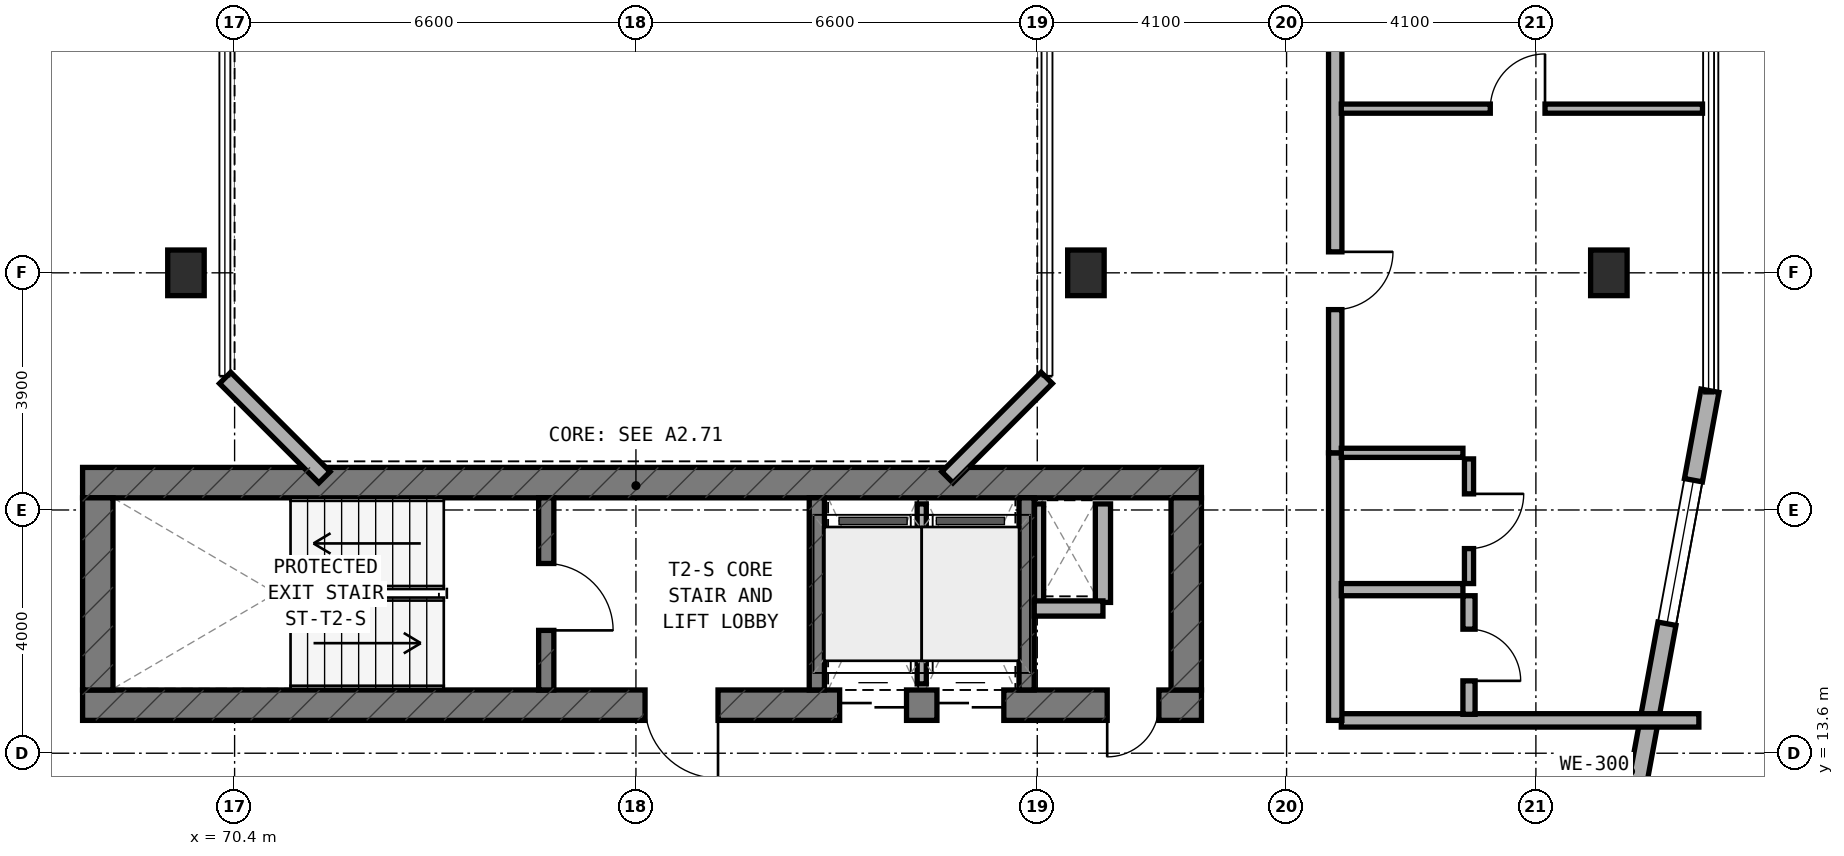
"""IFC4 building model, lengths in metres.
Left out: names, types, materials, properties, quantities, classifications, styles, units other than length and angle.
Written with IfcOpenShell. Run it as: python <this file> out.ifc"""

import sys

from ifc_helpers import new_model, si_unit, direction, frame, frame_2d, origin, origin_2d, place, context, subcontext, project, spatial, rectangle, extrude, element, fill, save


model = new_model("IFC4")
c1 = context("Model", 3, precision=1e-05, world=origin(), true_north=direction((0.0, 1.0)))
c2 = subcontext(c1, "Body", "Model", "MODEL_VIEW")
j1 = project(units=[si_unit("LENGTHUNIT", "METRE"), si_unit("PLANEANGLEUNIT", "RADIAN")], contexts=[c1])
p1 = place(None, origin())
s1 = spatial("IfcSite", under=j1, at=p1, CompositionType="ELEMENT")
p2 = place(p1, origin())
s2 = spatial("IfcBuilding", under=s1, at=p2, CompositionType="ELEMENT")
p3 = place(p2, frame((0.0, 0.0, 83.5)))
s3 = spatial("IfcBuildingStorey", under=s2, at=p3, CompositionType="ELEMENT", Elevation=83.5)
p4 = place(p3, frame((67.9, 14.39, 0.0), z_axis=(0.0, 0.0, 1.0), x_axis=(1.0, 0.0, 0.0)))
e1 = element("IfcWall", 1, at=p4, inside=s3, PredefinedType="SHEAR", context=c2, shape_type="SweptSolid", body=[
    extrude(rectangle(XDim=18.4, YDim=0.5, at=frame_2d((9.2, 0.0))), origin(), (0.0, 0.0, 1.0), 3.5),
])
p5 = place(p4, frame((9.25, 0.0, 0.0)))
e2 = element("IfcOpeningElement", 2, at=p5, cuts=e1, PredefinedType="OPENING", context=c2, shape_type="SweptSolid", body=[
    extrude(rectangle(XDim=1.2, YDim=2.15, at=frame_2d((0.6, 1.075))), frame((0.0, 0.26, 0.0), z_axis=(0.0, -1.0, 0.0), x_axis=(1.0, 0.0, 0.0)), (0.0, 0.0, 1.0), 0.52),
])
p6 = place(p4, frame((16.85, 0.0, 0.0)))
e3 = element("IfcOpeningElement", 3, at=p6, cuts=e1, PredefinedType="OPENING", context=c2, shape_type="SweptSolid", body=[
    extrude(rectangle(XDim=0.85, YDim=2.1, at=frame_2d((0.425, 1.05))), frame((0.0, 0.26, 0.0), z_axis=(0.0, -1.0, 0.0), x_axis=(1.0, 0.0, 0.0)), (0.0, 0.0, 1.0), 0.52),
])
p7 = place(p4, frame((12.45, 0.0, 0.0)))
e4 = element("IfcOpeningElement", 4, at=p7, cuts=e1, PredefinedType="OPENING", context=c2, shape_type="SweptSolid", body=[
    extrude(rectangle(XDim=1.1, YDim=2.15, at=frame_2d((0.55, 1.075))), frame((0.0, 0.26, 0.0), z_axis=(0.0, -1.0, 0.0), x_axis=(1.0, 0.0, 0.0)), (0.0, 0.0, 1.0), 0.52),
])
p8 = place(p4, frame((14.05, 0.0, 0.0)))
e5 = element("IfcOpeningElement", 5, at=p8, cuts=e1, PredefinedType="OPENING", context=c2, shape_type="SweptSolid", body=[
    extrude(rectangle(XDim=1.1, YDim=2.15, at=frame_2d((0.55, 1.075))), frame((0.0, 0.26, 0.0), z_axis=(0.0, -1.0, 0.0), x_axis=(1.0, 0.0, 0.0)), (0.0, 0.0, 1.0), 0.52),
])
p9 = place(p3, frame((67.9, 18.05, 0.0), z_axis=(0.0, 0.0, 1.0), x_axis=(1.0, 0.0, 0.0)))
e6 = element("IfcWall", 6, at=p9, inside=s3, PredefinedType="SHEAR", context=c2, shape_type="SweptSolid", body=[
    extrude(rectangle(XDim=18.4, YDim=0.5, at=frame_2d((9.2, 0.0))), origin(), (0.0, 0.0, 1.0), 3.5),
])
for number, where, z_axis, x_axis in (
    (7, (68.15, 14.64, 0.0), (0.0, 0.0, 1.0), (0.0, 1.0, 0.0)),
    (8, (86.05, 14.64, 0.0), (0.0, 0.0, 1.0), (0.0, 1.0, 0.0)),
):
    element("IfcWall", number, at=place(p3, frame(where, z_axis=z_axis, x_axis=x_axis)), inside=s3, PredefinedType="SHEAR", context=c2, shape_type="SweptSolid", body=[
        extrude(rectangle(XDim=3.16, YDim=0.5, at=frame_2d((1.58, 0.0))), origin(), (0.0, 0.0, 1.0), 3.5),
    ])
p10 = place(p3, frame((75.525, 14.64, 0.0), z_axis=(0.0, 0.0, 1.0), x_axis=(0.0, 1.0, 0.0)))
e9 = element("IfcWall", 9, at=p10, inside=s3, PredefinedType="STANDARD", context=c2, shape_type="SweptSolid", body=[
    extrude(rectangle(XDim=3.16, YDim=0.25, at=frame_2d((1.58, 0.0))), origin(), (0.0, 0.0, 1.0), 3.25),
])
p11 = place(p10, frame((0.98, 0.0, 0.0)))
e10 = element("IfcOpeningElement", 10, at=p11, cuts=e9, PredefinedType="OPENING", context=c2, shape_type="SweptSolid", body=[
    extrude(rectangle(XDim=1.1, YDim=2.15, at=frame_2d((0.55, 1.075))), frame((0.0, 0.135, 0.0), z_axis=(0.0, -1.0, 0.0), x_axis=(1.0, 0.0, 0.0)), (0.0, 0.0, 1.0), 0.27),
])
for number, where, z_axis, x_axis in (
    (11, (79.975, 14.64, 0.0), (0.0, 0.0, 1.0), (0.0, 1.0, 0.0)),
    (12, (83.425, 14.64, 0.0), (0.0, 0.0, 1.0), (0.0, 1.0, 0.0)),
):
    element("IfcWall", number, at=place(p3, frame(where, z_axis=z_axis, x_axis=x_axis)), inside=s3, PredefinedType="STANDARD", context=c2, shape_type="SweptSolid", body=[
        extrude(rectangle(XDim=3.16, YDim=0.25, at=frame_2d((1.58, 0.0))), origin(), (0.0, 0.0, 1.0), 3.25),
    ])
for number, where, z_axis, x_axis in (
    (13, (93.0, 21.5, 0.0), (0.0, 0.0, 1.0), (1.0, 0.0, 0.0)),
    (14, (69.6, 21.5, 0.0), (0.0, 0.0, 1.0), (1.0, 0.0, 0.0)),
    (15, (84.4, 21.5, 0.0), (0.0, 0.0, 1.0), (1.0, 0.0, 0.0)),
):
    element("IfcColumn", number, at=place(p3, frame(where, z_axis=z_axis, x_axis=x_axis)), inside=s3, PredefinedType="COLUMN", context=c2, shape_type="SweptSolid", body=[
        extrude(rectangle(XDim=0.6, YDim=0.75, at=origin_2d()), origin(), (0.0, 0.0, 1.0), 3.5),
    ])
p12 = place(p3, frame((93.051, 10.819, 0.0), z_axis=(0.0, 0.0, 1.0), x_axis=(0.181241420611, 0.983438634311, 0.0)))
e16 = element("IfcWall", 16, at=p12, inside=s3, PredefinedType="STANDARD", context=c2, shape_type="SweptSolid", body=[
    extrude(rectangle(XDim=8.889, YDim=0.3, at=frame_2d((4.445, 0.0))), origin(), (0.0, 0.0, 1.0), 3.25),
])
p13 = place(p12, frame((4.993, 0.0, 0.8)))
e17 = element("IfcOpeningElement", 17, at=p13, cuts=e16, PredefinedType="OPENING", context=c2, shape_type="SweptSolid", body=[
    extrude(rectangle(XDim=2.4, YDim=1.6, at=frame_2d((1.2, 0.8))), frame((0.0, 0.16, 0.0), z_axis=(0.0, -1.0, 0.0), x_axis=(1.0, 0.0, 0.0)), (0.0, 0.0, 1.0), 0.32),
])
for number, where, z_axis, x_axis in (
    (18, (82.122, 18.138, 0.0), (0.0, 0.0, 1.0), (0.707, 0.707, 0.0)),
    (19, (70.244, 19.772, 0.0), (0.0, 0.0, 1.0), (0.707, -0.707, 0.0)),
):
    element("IfcWall", number, at=place(p3, frame(where, z_axis=z_axis, x_axis=x_axis)), inside=s3, PredefinedType="STANDARD", context=c2, shape_type="SweptSolid", body=[
        extrude(rectangle(XDim=2.311, YDim=0.26, at=frame_2d((1.155, 0.0))), origin(), (0.0, 0.0, 1.0), 3.25),
    ])
p14 = place(p3, frame((83.63, 16.08, 0.0), z_axis=(0.0, 0.0, 1.0), x_axis=(0.0, 1.0, 0.0)))
e20 = element("IfcWall", 20, at=p14, inside=s3, PredefinedType="PARTITIONING", context=c2, shape_type="SweptSolid", body=[
    extrude(rectangle(XDim=1.62, YDim=0.15, at=frame_2d((0.81, 0.0))), origin(), (0.0, 0.0, 1.0), 2.825),
])
p15 = place(p3, frame((84.68, 16.08, 0.0), z_axis=(0.0, 0.0, 1.0), x_axis=(0.0, 1.0, 0.0)))
e21 = element("IfcWall", 21, at=p15, inside=s3, PredefinedType="SOLIDWALL", context=c2, shape_type="SweptSolid", body=[
    extrude(rectangle(XDim=1.62, YDim=0.25, at=frame_2d((0.81, 0.0))), origin(), (0.0, 0.0, 1.0), 3.22),
])
p16 = place(p3, frame((83.55, 15.98, 0.0), z_axis=(0.0, 0.0, 1.0), x_axis=(1.0, 0.0, 0.0)))
e22 = element("IfcWall", 22, at=p16, inside=s3, PredefinedType="SOLIDWALL", context=c2, shape_type="SweptSolid", body=[
    extrude(rectangle(XDim=1.13, YDim=0.25, at=frame_2d((0.565, 0.0))), origin(), (0.0, 0.0, 1.0), 3.22),
])
p17 = place(p3, frame((81.7, 14.74, 0.0), z_axis=(0.0, 0.0, 1.0), x_axis=(0.0, 1.0, 0.0)))
e23 = element("IfcWall", 23, at=p17, inside=s3, PredefinedType="PARTITIONING", context=c2, shape_type="SweptSolid", body=[
    extrude(rectangle(XDim=2.96, YDim=0.15, at=frame_2d((1.48, 0.0))), origin(), (0.0, 0.0, 1.0), 3.22),
])
p18 = place(p3, frame((88.6, 14.14, 0.0), z_axis=(0.0, 0.0, 1.0), x_axis=(1.0, 0.0, 0.0)))
e24 = element("IfcWall", 24, at=p18, inside=s3, PredefinedType="SOLIDWALL", context=c2, shape_type="SweptSolid", body=[
    extrude(rectangle(XDim=5.88, YDim=0.22, at=frame_2d((2.94, 0.0))), origin(), (0.0, 0.0, 1.0), 2.945),
])
p19 = place(p3, frame((88.5, 14.14, 0.0), z_axis=(0.0, 0.0, 1.0), x_axis=(0.0, 1.0, 0.0)))
e25 = element("IfcWall", 25, at=p19, inside=s3, PredefinedType="SOLIDWALL", context=c2, shape_type="SweptSolid", body=[
    extrude(rectangle(XDim=4.4, YDim=0.22, at=frame_2d((2.2, 0.0))), origin(), (0.0, 0.0, 1.0), 3.22),
])
p20 = place(p3, frame((88.5, 18.54, 0.0), z_axis=(0.0, 0.0, 1.0), x_axis=(0.0, 1.0, 0.0)))
e26 = element("IfcWall", 26, at=p20, inside=s3, PredefinedType="SOLIDWALL", context=c2, shape_type="SweptSolid", body=[
    extrude(rectangle(XDim=9.46, YDim=0.22, at=frame_2d((4.73, 0.0))), origin(), (0.0, 0.0, 1.0), 2.825),
])
p21 = place(p20, frame((2.355, 0.0, 0.0)))
e27 = element("IfcOpeningElement", 27, at=p21, cuts=e26, PredefinedType="OPENING", context=c2, shape_type="SweptSolid", body=[
    extrude(rectangle(XDim=0.95, YDim=2.1, at=frame_2d((0.475, 1.05))), frame((0.0, 0.12, 0.0), z_axis=(0.0, -1.0, 0.0), x_axis=(1.0, 0.0, 0.0)), (0.0, 0.0, 1.0), 0.24),
])
p22 = place(p3, frame((88.6, 24.2, 0.0), z_axis=(0.0, 0.0, 1.0), x_axis=(1.0, 0.0, 0.0)))
e28 = element("IfcWall", 28, at=p22, inside=s3, PredefinedType="PARTITIONING", context=c2, shape_type="SweptSolid", body=[
    extrude(rectangle(XDim=5.94, YDim=0.15, at=frame_2d((2.97, 0.0))), origin(), (0.0, 0.0, 1.0), 2.945),
])
p23 = place(p22, frame((2.45, 0.0, 0.0)))
e29 = element("IfcOpeningElement", 29, at=p23, cuts=e28, PredefinedType="OPENING", context=c2, shape_type="SweptSolid", body=[
    extrude(rectangle(XDim=0.9, YDim=2.1, at=frame_2d((0.45, 1.05))), frame((0.0, 0.085, 0.0), z_axis=(0.0, -1.0, 0.0), x_axis=(1.0, 0.0, 0.0)), (0.0, 0.0, 1.0), 0.17),
])
p24 = place(p3, frame((88.6, 16.29, 0.0), z_axis=(0.0, 0.0, 1.0), x_axis=(1.0, 0.0, 0.0)))
e30 = element("IfcWall", 30, at=p24, inside=s3, PredefinedType="PLUMBINGWALL", context=c2, shape_type="SweptSolid", body=[
    extrude(rectangle(XDim=2.0, YDim=0.2, at=frame_2d((1.0, 0.0))), origin(), (0.0, 0.0, 1.0), 3.22),
])
p25 = place(p3, frame((88.6, 18.54, 0.0), z_axis=(0.0, 0.0, 1.0), x_axis=(1.0, 0.0, 0.0)))
e31 = element("IfcWall", 31, at=p25, inside=s3, PredefinedType="PARTITIONING", context=c2, shape_type="SweptSolid", body=[
    extrude(rectangle(XDim=2.0, YDim=0.15, at=frame_2d((1.0, 0.0))), origin(), (0.0, 0.0, 1.0), 3.22),
])
p26 = place(p3, frame((90.7, 14.24, 0.0), z_axis=(0.0, 0.0, 1.0), x_axis=(0.0, 1.0, 0.0)))
e32 = element("IfcWall", 32, at=p26, inside=s3, PredefinedType="PLUMBINGWALL", context=c2, shape_type="SweptSolid", body=[
    extrude(rectangle(XDim=1.95, YDim=0.2, at=frame_2d((0.975, 0.0))), origin(), (0.0, 0.0, 1.0), 3.22),
])
p27 = place(p26, frame((0.55, 0.0, 0.0)))
e33 = element("IfcOpeningElement", 33, at=p27, cuts=e32, PredefinedType="OPENING", context=c2, shape_type="SweptSolid", body=[
    extrude(rectangle(XDim=0.85, YDim=2.1, at=frame_2d((0.425, 1.05))), frame((0.0, 0.11, 0.0), z_axis=(0.0, -1.0, 0.0), x_axis=(1.0, 0.0, 0.0)), (0.0, 0.0, 1.0), 0.22),
])
p28 = place(p3, frame((90.7, 16.39, 0.0), z_axis=(0.0, 0.0, 1.0), x_axis=(0.0, 1.0, 0.0)))
e34 = element("IfcWall", 34, at=p28, inside=s3, PredefinedType="PARTITIONING", context=c2, shape_type="SweptSolid", body=[
    extrude(rectangle(XDim=2.05, YDim=0.15, at=frame_2d((1.025, 0.0))), origin(), (0.0, 0.0, 1.0), 3.22),
])
p29 = place(p28, frame((0.575, 0.0, 0.0)))
e35 = element("IfcOpeningElement", 35, at=p29, cuts=e34, PredefinedType="OPENING", context=c2, shape_type="SweptSolid", body=[
    extrude(rectangle(XDim=0.9, YDim=2.1, at=frame_2d((0.45, 1.05))), frame((0.0, 0.085, 0.0), z_axis=(0.0, -1.0, 0.0), x_axis=(1.0, 0.0, 0.0)), (0.0, 0.0, 1.0), 0.17),
])
p30 = place(p13, origin())
e36 = element("IfcWindow", 36, at=p30, inside=s3, PartitioningType="SINGLE_PANEL", PredefinedType="WINDOW", context=c2, shape_type="SweptSolid", body=[
    extrude(rectangle(XDim=2.4, YDim=1.6, at=frame_2d((1.2, 0.8))), frame((0.0, 0.03, 0.0), z_axis=(0.0, -1.0, 0.0), x_axis=(1.0, 0.0, 0.0)), (0.0, 0.0, 1.0), 0.06),
])
fill(e17, e36)
p31 = place(p11, frame((1.1, 0.0, 0.0), z_axis=(0.0, 0.0, 1.0), x_axis=(-1.0, 0.0, 0.0)))
e37 = element("IfcDoor", 37, at=p31, inside=s3, OperationType="SINGLE_SWING_RIGHT", PredefinedType="DOOR", context=c2, shape_type="SweptSolid", body=[
    extrude(rectangle(XDim=1.1, YDim=2.15, at=frame_2d((0.55, 1.075))), frame((0.0, 0.025, 0.0), z_axis=(0.0, -1.0, 0.0), x_axis=(1.0, 0.0, 0.0)), (0.0, 0.0, 1.0), 0.05),
])
fill(e10, e37)
p32 = place(p5, frame((1.2, 0.0, 0.0), z_axis=(0.0, 0.0, 1.0), x_axis=(-1.0, 0.0, 0.0)))
e38 = element("IfcDoor", 38, at=p32, inside=s3, OperationType="SINGLE_SWING_LEFT", PredefinedType="DOOR", context=c2, shape_type="SweptSolid", body=[
    extrude(rectangle(XDim=1.2, YDim=2.15, at=frame_2d((0.6, 1.075))), frame((0.0, 0.025, 0.0), z_axis=(0.0, -1.0, 0.0), x_axis=(1.0, 0.0, 0.0)), (0.0, 0.0, 1.0), 0.05),
])
fill(e2, e38)
p33 = place(p6, frame((0.85, 0.0, 0.0), z_axis=(0.0, 0.0, 1.0), x_axis=(-1.0, 0.0, 0.0)))
e39 = element("IfcDoor", 39, at=p33, inside=s3, OperationType="SINGLE_SWING_RIGHT", PredefinedType="DOOR", context=c2, shape_type="SweptSolid", body=[
    extrude(rectangle(XDim=0.85, YDim=2.1, at=frame_2d((0.425, 1.05))), frame((0.0, 0.025, 0.0), z_axis=(0.0, -1.0, 0.0), x_axis=(1.0, 0.0, 0.0)), (0.0, 0.0, 1.0), 0.05),
])
fill(e3, e39)
p34 = place(p7, frame((1.1, 0.0, 0.0), z_axis=(0.0, 0.0, 1.0), x_axis=(-1.0, 0.0, 0.0)))
e40 = element("IfcDoor", 40, at=p34, inside=s3, OperationType="DOUBLE_DOOR_SLIDING", PredefinedType="DOOR", context=c2, shape_type="SweptSolid", body=[
    extrude(rectangle(XDim=1.1, YDim=2.15, at=frame_2d((0.55, 1.075))), frame((0.0, 0.025, 0.0), z_axis=(0.0, -1.0, 0.0), x_axis=(1.0, 0.0, 0.0)), (0.0, 0.0, 1.0), 0.05),
])
fill(e4, e40)
p35 = place(p8, frame((1.1, 0.0, 0.0), z_axis=(0.0, 0.0, 1.0), x_axis=(-1.0, 0.0, 0.0)))
e41 = element("IfcDoor", 41, at=p35, inside=s3, OperationType="DOUBLE_DOOR_SLIDING", PredefinedType="DOOR", context=c2, shape_type="SweptSolid", body=[
    extrude(rectangle(XDim=1.1, YDim=2.15, at=frame_2d((0.55, 1.075))), frame((0.0, 0.025, 0.0), z_axis=(0.0, -1.0, 0.0), x_axis=(1.0, 0.0, 0.0)), (0.0, 0.0, 1.0), 0.05),
])
fill(e5, e41)
p36 = place(p21, frame((0.95, 0.0, 0.0), z_axis=(0.0, 0.0, 1.0), x_axis=(-1.0, 0.0, 0.0)))
e42 = element("IfcDoor", 42, at=p36, inside=s3, OperationType="SINGLE_SWING_LEFT", PredefinedType="DOOR", context=c2, shape_type="SweptSolid", body=[
    extrude(rectangle(XDim=0.95, YDim=2.1, at=frame_2d((0.475, 1.05))), frame((0.0, 0.025, 0.0), z_axis=(0.0, -1.0, 0.0), x_axis=(1.0, 0.0, 0.0)), (0.0, 0.0, 1.0), 0.05),
])
fill(e27, e42)
p37 = place(p23, origin())
e43 = element("IfcDoor", 43, at=p37, inside=s3, OperationType="SINGLE_SWING_RIGHT", PredefinedType="DOOR", context=c2, shape_type="SweptSolid", body=[
    extrude(rectangle(XDim=0.9, YDim=2.1, at=frame_2d((0.45, 1.05))), frame((0.0, 0.025, 0.0), z_axis=(0.0, -1.0, 0.0), x_axis=(1.0, 0.0, 0.0)), (0.0, 0.0, 1.0), 0.05),
])
fill(e29, e43)
p38 = place(p27, frame((0.85, 0.0, 0.0), z_axis=(0.0, 0.0, 1.0), x_axis=(-1.0, 0.0, 0.0)))
e44 = element("IfcDoor", 44, at=p38, inside=s3, OperationType="SINGLE_SWING_RIGHT", PredefinedType="DOOR", context=c2, shape_type="SweptSolid", body=[
    extrude(rectangle(XDim=0.85, YDim=2.1, at=frame_2d((0.425, 1.05))), frame((0.0, 0.025, 0.0), z_axis=(0.0, -1.0, 0.0), x_axis=(1.0, 0.0, 0.0)), (0.0, 0.0, 1.0), 0.05),
])
fill(e33, e44)
p39 = place(p29, frame((0.9, 0.0, 0.0), z_axis=(0.0, 0.0, 1.0), x_axis=(-1.0, 0.0, 0.0)))
e45 = element("IfcDoor", 45, at=p39, inside=s3, OperationType="SINGLE_SWING_LEFT", PredefinedType="DOOR", context=c2, shape_type="SweptSolid", body=[
    extrude(rectangle(XDim=0.9, YDim=2.1, at=frame_2d((0.45, 1.05))), frame((0.0, 0.025, 0.0), z_axis=(0.0, -1.0, 0.0), x_axis=(1.0, 0.0, 0.0)), (0.0, 0.0, 1.0), 0.05),
])
fill(e35, e45)
save(model, sys.argv[1])
